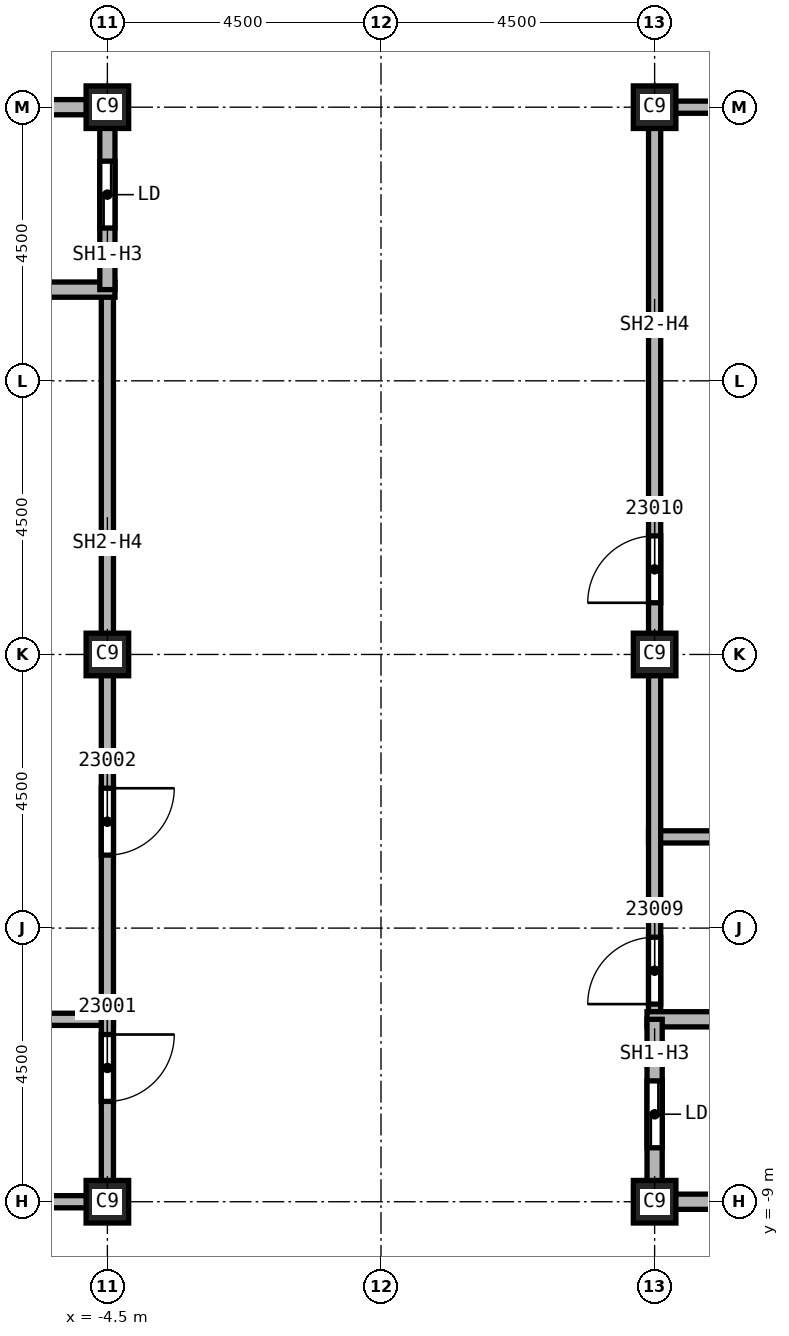
"""IFC4 building model, lengths in metres.
Left out: names, types, materials, properties, quantities, classifications, styles, units other than length and angle.
Written with IfcOpenShell. Run it as: python <this file> out.ifc"""

import sys

from ifc_helpers import new_model, si_unit, direction, frame, frame_2d, origin, origin_2d, place, context, subcontext, project, spatial, rectangle, extrude, element, fill, save


model = new_model("IFC4")
c1 = context("Model", 3, precision=1e-05, world=origin(), true_north=direction((0.0, 1.0)))
c2 = subcontext(c1, "Body", "Model", "MODEL_VIEW")
j1 = project(units=[si_unit("LENGTHUNIT", "METRE"), si_unit("PLANEANGLEUNIT", "RADIAN")], contexts=[c1])
p1 = place(None, origin())
s1 = spatial("IfcSite", under=j1, at=p1, CompositionType="ELEMENT")
p2 = place(p1, origin())
s2 = spatial("IfcBuilding", under=s1, at=p2, CompositionType="ELEMENT")
p3 = place(p2, frame((0.0, 0.0, 330.0)))
s3 = spatial("IfcBuildingStorey", under=s2, at=p3, CompositionType="ELEMENT", Elevation=330.0)
for number, where, z_axis, x_axis in (
    (1, (4.5, 0.0, 0.0), (0.0, 0.0, 1.0), (1.0, 0.0, 0.0)),
    (2, (4.5, 9.0, 0.0), (0.0, 0.0, 1.0), (1.0, 0.0, 0.0)),
    (3, (4.5, -9.0, 0.0), (0.0, 0.0, 1.0), (1.0, 0.0, 0.0)),
    (4, (-4.5, 0.0, 0.0), (0.0, 0.0, 1.0), (1.0, 0.0, 0.0)),
    (5, (-4.5, 9.0, 0.0), (0.0, 0.0, 1.0), (1.0, 0.0, 0.0)),
    (6, (-4.5, -9.0, 0.0), (0.0, 0.0, 1.0), (1.0, 0.0, 0.0)),
):
    element("IfcColumn", number, at=place(p3, frame(where, z_axis=z_axis, x_axis=x_axis)), inside=s3, PredefinedType="COLUMN", context=c2, shape_type="SweptSolid", body=[
        extrude(rectangle(XDim=0.7, YDim=0.7, at=origin_2d()), origin(), (0.0, 0.0, 1.0), 3.74),
    ])
p4 = place(p3, frame((-7.6, -6.0, 0.0), z_axis=(0.0, 0.0, 1.0), x_axis=(1.0, 0.0, 0.0)))
e7 = element("IfcWall", 7, at=p4, inside=s3, PredefinedType="SOLIDWALL", context=c2, shape_type="SweptSolid", body=[
    extrude(rectangle(XDim=3.2, YDim=0.2, at=frame_2d((1.6, 0.0))), origin(), (0.0, 0.0, 1.0), 3.74),
])
p5 = place(p3, frame((-4.5, -9.0, 0.0), z_axis=(0.0, 0.0, 1.0), x_axis=(-1.0, 0.0, 0.0)))
e8 = element("IfcWall", 8, at=p5, inside=s3, PredefinedType="SOLIDWALL", context=c2, shape_type="SweptSolid", body=[
    extrude(rectangle(XDim=3.0, YDim=0.2, at=frame_2d((1.5, 0.0))), origin(), (0.0, 0.0, 1.0), 3.062),
])
p6 = place(p3, frame((-4.5, 6.0, 0.0), z_axis=(0.0, 0.0, 1.0), x_axis=(0.0, -1.0, 0.0)))
e9 = element("IfcWall", 9, at=p6, inside=s3, PredefinedType="SOLIDWALL", context=c2, shape_type="SweptSolid", body=[
    extrude(rectangle(XDim=15.1, YDim=0.2, at=frame_2d((7.55, 0.0))), origin(), (0.0, 0.0, 1.0), 3.062),
])
p7 = place(p6, frame((12.25, 0.0, 0.0)))
e10 = element("IfcOpeningElement", 10, at=p7, cuts=e9, PredefinedType="OPENING", context=c2, shape_type="SweptSolid", body=[
    extrude(rectangle(XDim=1.1, YDim=2.1, at=frame_2d((0.55, 1.05))), frame((0.0, 0.1, 0.0), z_axis=(0.0, -1.0, 0.0), x_axis=(1.0, 0.0, 0.0)), (0.0, 0.0, 1.0), 0.2),
])
p8 = place(p6, frame((8.2, 0.0, 0.0)))
e11 = element("IfcOpeningElement", 11, at=p8, cuts=e9, PredefinedType="OPENING", context=c2, shape_type="SweptSolid", body=[
    extrude(rectangle(XDim=1.1, YDim=2.1, at=frame_2d((0.55, 1.05))), frame((0.0, 0.1, 0.0), z_axis=(0.0, -1.0, 0.0), x_axis=(1.0, 0.0, 0.0)), (0.0, 0.0, 1.0), 0.2),
])
p9 = place(p3, frame((4.4, -3.0, 0.0), z_axis=(0.0, 0.0, 1.0), x_axis=(1.0, 0.0, 0.0)))
e12 = element("IfcWall", 12, at=p9, inside=s3, PredefinedType="SOLIDWALL", context=c2, shape_type="SweptSolid", body=[
    extrude(rectangle(XDim=3.225, YDim=0.2, at=frame_2d((1.613, 0.0))), origin(), (0.0, 0.0, 1.0), 3.74),
])
p10 = place(p3, frame((4.5, -6.0, 0.0), z_axis=(0.0, 0.0, 1.0), x_axis=(0.0, 1.0, 0.0)))
e13 = element("IfcWall", 13, at=p10, inside=s3, PredefinedType="SOLIDWALL", context=c2, shape_type="SweptSolid", body=[
    extrude(rectangle(XDim=15.1, YDim=0.2, at=frame_2d((7.55, 0.0))), origin(), (0.0, 0.0, 1.0), 3.062),
])
p11 = place(p10, frame((0.25, 0.0, 0.0)))
e14 = element("IfcOpeningElement", 14, at=p11, cuts=e13, PredefinedType="OPENING", context=c2, shape_type="SweptSolid", body=[
    extrude(rectangle(XDim=1.1, YDim=2.1, at=frame_2d((0.55, 1.05))), frame((0.0, 0.1, 0.0), z_axis=(0.0, -1.0, 0.0), x_axis=(1.0, 0.0, 0.0)), (0.0, 0.0, 1.0), 0.2),
])
p12 = place(p10, frame((6.85, 0.0, 0.0)))
e15 = element("IfcOpeningElement", 15, at=p12, cuts=e13, PredefinedType="OPENING", context=c2, shape_type="SweptSolid", body=[
    extrude(rectangle(XDim=1.1, YDim=2.1, at=frame_2d((0.55, 1.05))), frame((0.0, 0.1, 0.0), z_axis=(0.0, -1.0, 0.0), x_axis=(1.0, 0.0, 0.0)), (0.0, 0.0, 1.0), 0.2),
])
p13 = place(p3, frame((4.5, 9.0, 0.0), z_axis=(0.0, 0.0, 1.0), x_axis=(1.0, 0.0, 0.0)))
e16 = element("IfcWall", 16, at=p13, inside=s3, PredefinedType="SOLIDWALL", context=c2, shape_type="SweptSolid", body=[
    extrude(rectangle(XDim=3.0, YDim=0.2, at=frame_2d((1.5, 0.0))), origin(), (0.0, 0.0, 1.0), 3.062),
])
p14 = place(p3, frame((-7.625, 6.0, 0.0), z_axis=(0.0, 0.0, 1.0), x_axis=(1.0, 0.0, 0.0)))
e17 = element("IfcWall", 17, at=p14, inside=s3, PredefinedType="SOLIDWALL", context=c2, shape_type="SweptSolid", body=[
    extrude(rectangle(XDim=3.25, YDim=0.25, at=frame_2d((1.625, 0.0))), origin(), (0.0, 0.0, 1.0), 3.74),
])
p15 = place(p3, frame((-7.5, 9.0, 0.0), z_axis=(0.0, 0.0, 1.0), x_axis=(1.0, 0.0, 0.0)))
e18 = element("IfcWall", 18, at=p15, inside=s3, PredefinedType="SOLIDWALL", context=c2, shape_type="SweptSolid", body=[
    extrude(rectangle(XDim=3.0, YDim=0.25, at=frame_2d((1.5, 0.0))), origin(), (0.0, 0.0, 1.0), 3.062),
])
p16 = place(p3, frame((-4.5, 9.125, 0.0), z_axis=(0.0, 0.0, 1.0), x_axis=(0.0, -1.0, 0.0)))
e19 = element("IfcWall", 19, at=p16, inside=s3, PredefinedType="SOLIDWALL", context=c2, shape_type="SweptSolid", body=[
    extrude(rectangle(XDim=3.125, YDim=0.25, at=frame_2d((1.562, 0.0))), origin(), (0.0, 0.0, 1.0), 3.062),
])
p17 = place(p16, frame((1.012, 0.0, 0.0)))
e20 = element("IfcOpeningElement", 20, at=p17, cuts=e19, PredefinedType="OPENING", context=c2, shape_type="SweptSolid", body=[
    extrude(rectangle(XDim=1.1, YDim=2.1, at=frame_2d((0.55, 1.05))), frame((0.0, 0.125, 0.0), z_axis=(0.0, -1.0, 0.0), x_axis=(1.0, 0.0, 0.0)), (0.0, 0.0, 1.0), 0.25),
])
p18 = place(p3, frame((4.375, -6.0, 0.0), z_axis=(0.0, 0.0, 1.0), x_axis=(1.0, 0.0, 0.0)))
e21 = element("IfcWall", 21, at=p18, inside=s3, PredefinedType="SOLIDWALL", context=c2, shape_type="SweptSolid", body=[
    extrude(rectangle(XDim=3.25, YDim=0.25, at=frame_2d((1.625, 0.0))), origin(), (0.0, 0.0, 1.0), 3.74),
])
p19 = place(p3, frame((4.5, -9.125, 0.0), z_axis=(0.0, 0.0, 1.0), x_axis=(0.0, 1.0, 0.0)))
e22 = element("IfcWall", 22, at=p19, inside=s3, PredefinedType="SOLIDWALL", context=c2, shape_type="SweptSolid", body=[
    extrude(rectangle(XDim=3.125, YDim=0.25, at=frame_2d((1.562, 0.0))), origin(), (0.0, 0.0, 1.0), 3.062),
])
p20 = place(p19, frame((1.012, 0.0, 0.0)))
e23 = element("IfcOpeningElement", 23, at=p20, cuts=e22, PredefinedType="OPENING", context=c2, shape_type="SweptSolid", body=[
    extrude(rectangle(XDim=1.1, YDim=2.1, at=frame_2d((0.55, 1.05))), frame((0.0, 0.125, 0.0), z_axis=(0.0, -1.0, 0.0), x_axis=(1.0, 0.0, 0.0)), (0.0, 0.0, 1.0), 0.25),
])
p21 = place(p3, frame((7.5, -9.0, 0.0), z_axis=(0.0, 0.0, 1.0), x_axis=(-1.0, 0.0, 0.0)))
e24 = element("IfcWall", 24, at=p21, inside=s3, PredefinedType="SOLIDWALL", context=c2, shape_type="SweptSolid", body=[
    extrude(rectangle(XDim=3.0, YDim=0.25, at=frame_2d((1.5, 0.0))), origin(), (0.0, 0.0, 1.0), 3.062),
])
p22 = place(p7, origin())
e25 = element("IfcDoor", 25, at=p22, inside=s3, OperationType="SINGLE_SWING_RIGHT", PredefinedType="DOOR", context=c2, shape_type="SweptSolid", body=[
    extrude(rectangle(XDim=1.1, YDim=2.1, at=frame_2d((0.55, 1.05))), frame((0.0, 0.025, 0.0), z_axis=(0.0, -1.0, 0.0), x_axis=(1.0, 0.0, 0.0)), (0.0, 0.0, 1.0), 0.05),
])
fill(e10, e25)
p23 = place(p8, origin())
e26 = element("IfcDoor", 26, at=p23, inside=s3, OperationType="SINGLE_SWING_LEFT", PredefinedType="DOOR", context=c2, shape_type="SweptSolid", body=[
    extrude(rectangle(XDim=1.1, YDim=2.1, at=frame_2d((0.55, 1.05))), frame((0.0, 0.025, 0.0), z_axis=(0.0, -1.0, 0.0), x_axis=(1.0, 0.0, 0.0)), (0.0, 0.0, 1.0), 0.05),
])
fill(e11, e26)
p24 = place(p11, origin())
e27 = element("IfcDoor", 27, at=p24, inside=s3, OperationType="SINGLE_SWING_RIGHT", PredefinedType="DOOR", context=c2, shape_type="SweptSolid", body=[
    extrude(rectangle(XDim=1.1, YDim=2.1, at=frame_2d((0.55, 1.05))), frame((0.0, 0.025, 0.0), z_axis=(0.0, -1.0, 0.0), x_axis=(1.0, 0.0, 0.0)), (0.0, 0.0, 1.0), 0.05),
])
fill(e14, e27)
p25 = place(p12, origin())
e28 = element("IfcDoor", 28, at=p25, inside=s3, OperationType="SINGLE_SWING_LEFT", PredefinedType="DOOR", context=c2, shape_type="SweptSolid", body=[
    extrude(rectangle(XDim=1.1, YDim=2.1, at=frame_2d((0.55, 1.05))), frame((0.0, 0.025, 0.0), z_axis=(0.0, -1.0, 0.0), x_axis=(1.0, 0.0, 0.0)), (0.0, 0.0, 1.0), 0.05),
])
fill(e15, e28)
p26 = place(p17, origin())
e29 = element("IfcDoor", 29, at=p26, inside=s3, OperationType="SLIDING_TO_LEFT", PredefinedType="DOOR", context=c2, shape_type="SweptSolid", body=[
    extrude(rectangle(XDim=1.1, YDim=2.1, at=frame_2d((0.55, 1.05))), frame((0.0, 0.025, 0.0), z_axis=(0.0, -1.0, 0.0), x_axis=(1.0, 0.0, 0.0)), (0.0, 0.0, 1.0), 0.05),
])
fill(e20, e29)
p27 = place(p20, origin())
e30 = element("IfcDoor", 30, at=p27, inside=s3, OperationType="SLIDING_TO_LEFT", PredefinedType="DOOR", context=c2, shape_type="SweptSolid", body=[
    extrude(rectangle(XDim=1.1, YDim=2.1, at=frame_2d((0.55, 1.05))), frame((0.0, 0.025, 0.0), z_axis=(0.0, -1.0, 0.0), x_axis=(1.0, 0.0, 0.0)), (0.0, 0.0, 1.0), 0.05),
])
fill(e23, e30)
save(model, sys.argv[1])
